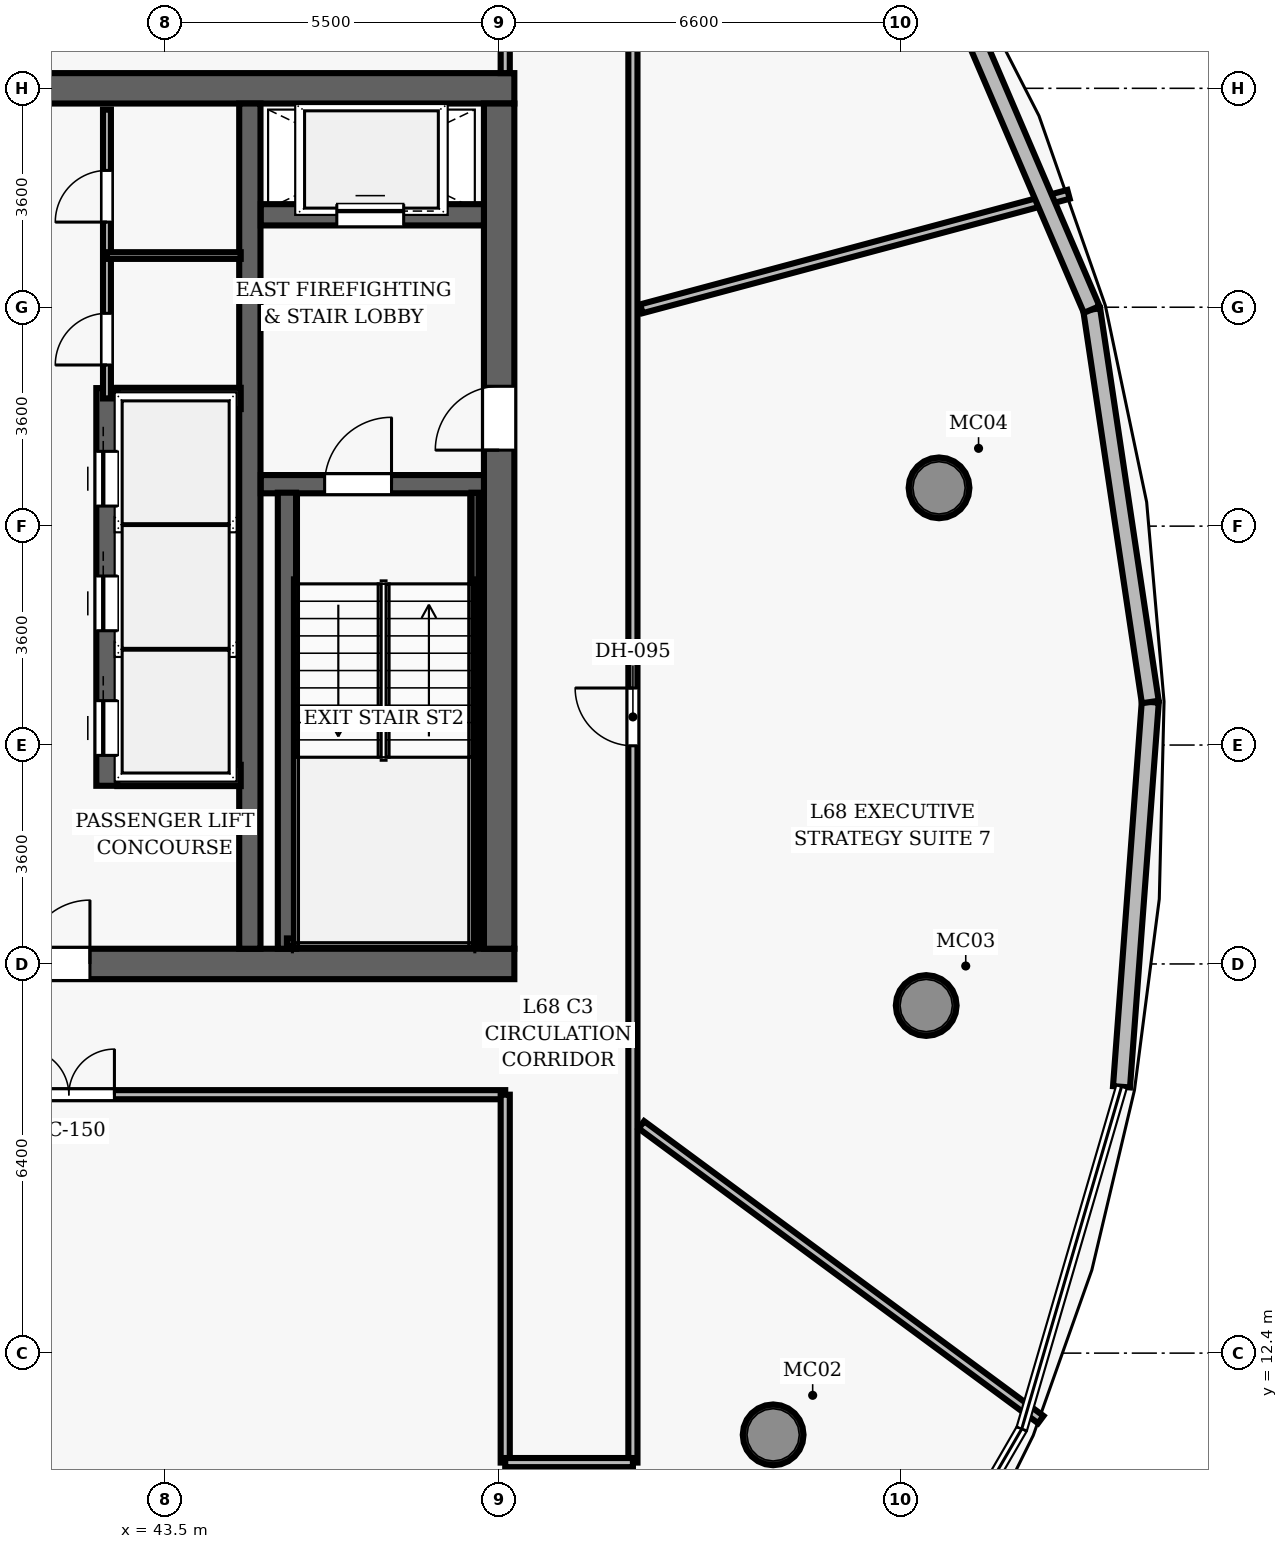
"""IFC4 building model, lengths in metres.
Left out: names, types, materials, properties, quantities, classifications, styles, units other than length and angle.
Written with IfcOpenShell. Run it as: python <this file> out.ifc"""

import sys

from ifc_helpers import new_model, si_unit, direction, frame, frame_2d, origin, origin_2d, place, context, subcontext, project, spatial, rectangle, hollow_circle, extrude, element, fill, save


model = new_model("IFC4")
c1 = context("Model", 3, precision=1e-05, world=origin(), true_north=direction((0.0, 1.0)))
c2 = subcontext(c1, "Body", "Model", "MODEL_VIEW")
j1 = project(units=[si_unit("LENGTHUNIT", "METRE"), si_unit("PLANEANGLEUNIT", "RADIAN")], contexts=[c1])
p1 = place(None, origin())
s1 = spatial("IfcSite", under=j1, at=p1, CompositionType="ELEMENT")
p2 = place(p1, origin())
s2 = spatial("IfcBuilding", under=s1, at=p2, CompositionType="ELEMENT")
p3 = place(p2, frame((0.0, 0.0, 269.0)))
s3 = spatial("IfcBuildingStorey", under=s2, at=p3, CompositionType="ELEMENT", Elevation=269.0)
p4 = place(p3, frame((26.75, 18.8, 0.0), z_axis=(0.0, 0.0, 1.0), x_axis=(1.0, 0.0, 0.0)))
e1 = element("IfcWall", 1, at=p4, inside=s3, PredefinedType="SHEAR", context=c2, shape_type="SweptSolid", body=[
    extrude(rectangle(XDim=22.5, YDim=0.5, at=frame_2d((11.25, 0.0))), origin(), (0.0, 0.0, 1.0), 3.85),
])
p5 = place(p4, frame((14.47, 0.0, 0.0)))
e2 = element("IfcOpeningElement", 2, at=p5, cuts=e1, PredefinedType="OPENING", context=c2, shape_type="SweptSolid", body=[
    extrude(rectangle(XDim=1.05, YDim=2.15, at=frame_2d((0.525, 1.075))), frame((0.0, 0.26, 0.0), z_axis=(0.0, -1.0, 0.0), x_axis=(1.0, 0.0, 0.0)), (0.0, 0.0, 1.0), 0.52),
])
p6 = place(p3, frame((26.75, 33.2, 0.0), z_axis=(0.0, 0.0, 1.0), x_axis=(1.0, 0.0, 0.0)))
e3 = element("IfcWall", 3, at=p6, inside=s3, PredefinedType="SHEAR", context=c2, shape_type="SweptSolid", body=[
    extrude(rectangle(XDim=22.5, YDim=0.5, at=frame_2d((11.25, 0.0))), origin(), (0.0, 0.0, 1.0), 3.85),
])
p7 = place(p3, frame((49.0, 19.05, 0.0), z_axis=(0.0, 0.0, 1.0), x_axis=(0.0, 1.0, 0.0)))
e4 = element("IfcWall", 4, at=p7, inside=s3, PredefinedType="SHEAR", context=c2, shape_type="SweptSolid", body=[
    extrude(rectangle(XDim=13.9, YDim=0.5, at=frame_2d((6.95, 0.0))), origin(), (0.0, 0.0, 1.0), 3.85),
])
p8 = place(p7, frame((8.2, 0.0, 0.0)))
e5 = element("IfcOpeningElement", 5, at=p8, cuts=e4, PredefinedType="OPENING", context=c2, shape_type="SweptSolid", body=[
    extrude(rectangle(XDim=1.05, YDim=2.15, at=frame_2d((0.525, 1.075))), frame((0.0, 0.26, 0.0), z_axis=(0.0, -1.0, 0.0), x_axis=(1.0, 0.0, 0.0)), (0.0, 0.0, 1.0), 0.52),
])
p9 = place(p3, frame((44.9, 19.05, 0.0), z_axis=(0.0, 0.0, 1.0), x_axis=(0.0, 1.0, 0.0)))
e6 = element("IfcWall", 6, at=p9, inside=s3, PredefinedType="SHEAR", context=c2, shape_type="SweptSolid", body=[
    extrude(rectangle(XDim=13.9, YDim=0.35, at=frame_2d((6.95, 0.0))), origin(), (0.0, 0.0, 1.0), 3.85),
])
for number, where, z_axis, x_axis in (
    (7, (53.506, 11.056, 0.0), (0.0, 0.0, 1.0), (1.0, 0.0, 0.0)),
    (8, (56.024, 18.116, 0.0), (0.0, 0.0, 1.0), (1.0, 0.0, 0.0)),
    (9, (56.235, 26.629, 0.0), (0.0, 0.0, 1.0), (1.0, 0.0, 0.0)),
):
    element("IfcColumn", number, at=place(p3, frame(where, z_axis=z_axis, x_axis=x_axis)), inside=s3, PredefinedType="COLUMN", context=c2, shape_type="SweptSolid", body=[
        extrude(hollow_circle(Radius=0.5, WallThickness=0.045, at=origin_2d()), origin(), (0.0, 0.0, 1.0), 3.85),
    ])
p10 = place(p3, frame((45.08, 26.69, 0.0), z_axis=(0.0, 0.0, 1.0), x_axis=(1.0, 0.0, 0.0)))
e10 = element("IfcWall", 10, at=p10, inside=s3, PredefinedType="SHEAR", context=c2, shape_type="SweptSolid", body=[
    extrude(rectangle(XDim=3.67, YDim=0.3, at=frame_2d((1.835, 0.0))), origin(), (0.0, 0.0, 1.0), 3.85),
])
p11 = place(p10, frame((1.05, 0.0, 0.0)))
e11 = element("IfcOpeningElement", 11, at=p11, cuts=e10, PredefinedType="OPENING", context=c2, shape_type="SweptSolid", body=[
    extrude(rectangle(XDim=1.1, YDim=2.15, at=frame_2d((0.55, 1.075))), frame((0.0, 0.16, 0.0), z_axis=(0.0, -1.0, 0.0), x_axis=(1.0, 0.0, 0.0)), (0.0, 0.0, 1.0), 0.32),
])
p12 = place(p3, frame((45.51, 19.05, 0.0), z_axis=(0.0, 0.0, 1.0), x_axis=(0.0, 1.0, 0.0)))
e12 = element("IfcWall", 12, at=p12, inside=s3, PredefinedType="SHEAR", context=c2, shape_type="SweptSolid", body=[
    extrude(rectangle(XDim=7.5, YDim=0.3, at=frame_2d((3.75, 0.0))), origin(), (0.0, 0.0, 1.0), 3.85),
])
p13 = place(p3, frame((48.605, 19.1, 0.0), z_axis=(0.0, 0.0, 1.0), x_axis=(0.0, 1.0, 0.0)))
e13 = element("IfcWall", 13, at=p13, inside=s3, PredefinedType="SHEAR", context=c2, shape_type="SweptSolid", body=[
    extrude(rectangle(XDim=7.45, YDim=0.12, at=frame_2d((3.725, 0.0))), origin(), (0.0, 0.0, 1.0), 3.85),
])
p14 = place(p3, frame((45.51, 19.16, 0.0), z_axis=(0.0, 0.0, 1.0), x_axis=(1.0, 0.0, 0.0)))
e14 = element("IfcWall", 14, at=p14, inside=s3, PredefinedType="SHEAR", context=c2, shape_type="SweptSolid", body=[
    extrude(rectangle(XDim=3.095, YDim=0.12, at=frame_2d((1.547, 0.0))), origin(), (0.0, 0.0, 1.0), 3.85),
])
p15 = place(p3, frame((45.08, 31.12, 0.0), z_axis=(0.0, 0.0, 1.0), x_axis=(1.0, 0.0, 0.0)))
e15 = element("IfcWall", 15, at=p15, inside=s3, PredefinedType="SHEAR", context=c2, shape_type="SweptSolid", body=[
    extrude(rectangle(XDim=3.67, YDim=0.35, at=frame_2d((1.835, 0.0))), origin(), (0.0, 0.0, 1.0), 3.04),
])
p16 = place(p15, frame((1.25, 0.0, 0.0)))
e16 = element("IfcOpeningElement", 16, at=p16, cuts=e15, PredefinedType="OPENING", context=c2, shape_type="SweptSolid", body=[
    extrude(rectangle(XDim=1.1, YDim=2.15, at=frame_2d((0.55, 1.075))), frame((0.0, 0.185, 0.0), z_axis=(0.0, -1.0, 0.0), x_axis=(1.0, 0.0, 0.0)), (0.0, 0.0, 1.0), 0.37),
])
p17 = place(p3, frame((42.55, 21.73, 0.0), z_axis=(0.0, 0.0, 1.0), x_axis=(0.0, 1.0, 0.0)))
e17 = element("IfcWall", 17, at=p17, inside=s3, PredefinedType="SHEAR", context=c2, shape_type="SweptSolid", body=[
    extrude(rectangle(XDim=6.54, YDim=0.35, at=frame_2d((3.27, 0.0))), origin(), (0.0, 0.0, 1.0), 3.04),
])
p18 = place(p17, frame((0.5, 0.0, 0.0)))
e18 = element("IfcOpeningElement", 18, at=p18, cuts=e17, PredefinedType="OPENING", context=c2, shape_type="SweptSolid", body=[
    extrude(rectangle(XDim=0.9, YDim=2.15, at=frame_2d((0.45, 1.075))), frame((0.0, 0.185, 0.0), z_axis=(0.0, -1.0, 0.0), x_axis=(1.0, 0.0, 0.0)), (0.0, 0.0, 1.0), 0.37),
])
p19 = place(p17, frame((2.55, 0.0, 0.0)))
e19 = element("IfcOpeningElement", 19, at=p19, cuts=e17, PredefinedType="OPENING", context=c2, shape_type="SweptSolid", body=[
    extrude(rectangle(XDim=0.9, YDim=2.15, at=frame_2d((0.45, 1.075))), frame((0.0, 0.185, 0.0), z_axis=(0.0, -1.0, 0.0), x_axis=(1.0, 0.0, 0.0)), (0.0, 0.0, 1.0), 0.37),
])
p20 = place(p17, frame((4.6, 0.0, 0.0)))
e20 = element("IfcOpeningElement", 20, at=p20, cuts=e17, PredefinedType="OPENING", context=c2, shape_type="SweptSolid", body=[
    extrude(rectangle(XDim=0.9, YDim=2.15, at=frame_2d((0.45, 1.075))), frame((0.0, 0.185, 0.0), z_axis=(0.0, -1.0, 0.0), x_axis=(1.0, 0.0, 0.0)), (0.0, 0.0, 1.0), 0.37),
])
for number, where, z_axis, x_axis in (
    (21, (42.72, 21.9, 0.0), (0.0, 0.0, 1.0), (1.0, 0.0, 0.0)),
    (22, (42.72, 28.1, 0.0), (0.0, 0.0, 1.0), (1.0, 0.0, 0.0)),
):
    element("IfcWall", number, at=place(p3, frame(where, z_axis=z_axis, x_axis=x_axis)), inside=s3, PredefinedType="SHEAR", context=c2, shape_type="SweptSolid", body=[
        extrude(rectangle(XDim=2.03, YDim=0.35, at=frame_2d((1.015, 0.0))), origin(), (0.0, 0.0, 1.0), 3.04),
    ])
p21 = place(p3, frame((42.55, 28.1, 0.0), z_axis=(0.0, 0.0, 1.0), x_axis=(0.0, 1.0, 0.0)))
e23 = element("IfcWall", 23, at=p21, inside=s3, PredefinedType="PARTITIONING", context=c2, shape_type="SweptSolid", body=[
    extrude(rectangle(XDim=4.75, YDim=0.13, at=frame_2d((2.375, 0.0))), origin(), (0.0, 0.0, 1.0), 3.04),
])
p22 = place(p21, frame((0.55, 0.0, 0.0)))
e24 = element("IfcOpeningElement", 24, at=p22, cuts=e23, PredefinedType="OPENING", context=c2, shape_type="SweptSolid", body=[
    extrude(rectangle(XDim=0.85, YDim=2.1, at=frame_2d((0.425, 1.05))), frame((0.0, 0.075, 0.0), z_axis=(0.0, -1.0, 0.0), x_axis=(1.0, 0.0, 0.0)), (0.0, 0.0, 1.0), 0.15),
])
p23 = place(p21, frame((2.9, 0.0, 0.0)))
e25 = element("IfcOpeningElement", 25, at=p23, cuts=e23, PredefinedType="OPENING", context=c2, shape_type="SweptSolid", body=[
    extrude(rectangle(XDim=0.85, YDim=2.1, at=frame_2d((0.425, 1.05))), frame((0.0, 0.075, 0.0), z_axis=(0.0, -1.0, 0.0), x_axis=(1.0, 0.0, 0.0)), (0.0, 0.0, 1.0), 0.15),
])
p24 = place(p3, frame((42.55, 30.45, 0.0), z_axis=(0.0, 0.0, 1.0), x_axis=(1.0, 0.0, 0.0)))
e26 = element("IfcWall", 26, at=p24, inside=s3, PredefinedType="PARTITIONING", context=c2, shape_type="SweptSolid", body=[
    extrude(rectangle(XDim=2.2, YDim=0.11, at=frame_2d((1.1, 0.0))), origin(), (0.0, 0.0, 1.0), 3.04),
])
p25 = place(p3, frame((26.9, 16.65, 0.0), z_axis=(0.0, 0.0, 1.0), x_axis=(1.0, 0.0, 0.0)))
e27 = element("IfcWall", 27, at=p25, inside=s3, PredefinedType="PARTITIONING", context=c2, shape_type="SweptSolid", body=[
    extrude(rectangle(XDim=22.2, YDim=0.15, at=frame_2d((11.1, 0.0))), origin(), (0.0, 0.0, 1.0), 3.04),
])
p26 = place(p25, frame((8.338, 0.0, 0.0)))
e28 = element("IfcOpeningElement", 28, at=p26, cuts=e27, PredefinedType="OPENING", context=c2, shape_type="SweptSolid", body=[
    extrude(rectangle(XDim=0.95, YDim=2.15, at=frame_2d((0.475, 1.075))), frame((0.0, 0.085, 0.0), z_axis=(0.0, -1.0, 0.0), x_axis=(1.0, 0.0, 0.0)), (0.0, 0.0, 1.0), 0.17),
])
p27 = place(p25, frame((14.273, 0.0, 0.0)))
e29 = element("IfcOpeningElement", 29, at=p27, cuts=e27, PredefinedType="OPENING", context=c2, shape_type="SweptSolid", body=[
    extrude(rectangle(XDim=1.5, YDim=2.2, at=frame_2d((0.75, 1.1))), frame((0.0, 0.085, 0.0), z_axis=(0.0, -1.0, 0.0), x_axis=(1.0, 0.0, 0.0)), (0.0, 0.0, 1.0), 0.17),
])
p28 = place(p3, frame((51.2, 10.6, 0.0), z_axis=(0.0, 0.0, 1.0), x_axis=(0.0, 1.0, 0.0)))
e30 = element("IfcWall", 30, at=p28, inside=s3, PredefinedType="PARTITIONING", context=c2, shape_type="SweptSolid", body=[
    extrude(rectangle(XDim=30.104, YDim=0.15, at=frame_2d((15.052, 0.0))), origin(), (0.0, 0.0, 1.0), 3.04),
])
p29 = place(p28, frame((26.496, 0.0, 0.0)))
e31 = element("IfcOpeningElement", 31, at=p29, cuts=e30, PredefinedType="OPENING", context=c2, shape_type="SweptSolid", body=[
    extrude(rectangle(XDim=1.5, YDim=2.2, at=frame_2d((0.75, 1.1))), frame((0.0, 0.085, 0.0), z_axis=(0.0, -1.0, 0.0), x_axis=(1.0, 0.0, 0.0)), (0.0, 0.0, 1.0), 0.17),
])
p30 = place(p28, frame((11.788, 0.0, 0.0)))
e32 = element("IfcOpeningElement", 32, at=p30, cuts=e30, PredefinedType="OPENING", context=c2, shape_type="SweptSolid", body=[
    extrude(rectangle(XDim=0.95, YDim=2.15, at=frame_2d((0.475, 1.075))), frame((0.0, 0.085, 0.0), z_axis=(0.0, -1.0, 0.0), x_axis=(1.0, 0.0, 0.0)), (0.0, 0.0, 1.0), 0.17),
])
p31 = place(p3, frame((49.1, 10.6, 0.0), z_axis=(0.0, 0.0, 1.0), x_axis=(0.0, 1.0, 0.0)))
e33 = element("IfcWall", 33, at=p31, inside=s3, PredefinedType="PARTITIONING", context=c2, shape_type="SweptSolid", body=[
    extrude(rectangle(XDim=6.05, YDim=0.15, at=frame_2d((3.025, 0.0))), origin(), (0.0, 0.0, 1.0), 3.04),
])
p32 = place(p3, frame((49.1, 33.45, 0.0), z_axis=(0.0, 0.0, 1.0), x_axis=(0.0, 1.0, 0.0)))
e34 = element("IfcWall", 34, at=p32, inside=s3, PredefinedType="PARTITIONING", context=c2, shape_type="SweptSolid", body=[
    extrude(rectangle(XDim=7.254, YDim=0.15, at=frame_2d((3.627, 0.0))), origin(), (0.0, 0.0, 1.0), 3.04),
])
p33 = place(p3, frame((49.1, 10.6, 0.0), z_axis=(0.0, 0.0, 1.0), x_axis=(1.0, 0.0, 0.0)))
e35 = element("IfcWall", 35, at=p33, inside=s3, PredefinedType="PARTITIONING", context=c2, shape_type="SweptSolid", body=[
    extrude(rectangle(XDim=2.1, YDim=0.15, at=frame_2d((1.05, 0.0))), origin(), (0.0, 0.0, 1.0), 3.04),
])
p34 = place(p3, frame((51.34, 29.574, 0.0), z_axis=(0.0, 0.0, 1.0), x_axis=(0.96592722136, 0.258813838569, 0.0)))
e36 = element("IfcWall", 36, at=p34, inside=s3, PredefinedType="PARTITIONING", context=c2, shape_type="SweptSolid", body=[
    extrude(rectangle(XDim=7.272, YDim=0.15, at=frame_2d((3.636, 0.0))), origin(), (0.0, 0.0, 1.0), 3.04),
])
p35 = place(p3, frame((41.259, 33.47, 0.0), z_axis=(0.0, 0.0, 1.0), x_axis=(0.399896869604, 0.916560141879, 0.0)))
e37 = element("IfcWall", 37, at=p35, inside=s3, PredefinedType="PARTITIONING", context=c2, shape_type="SweptSolid", body=[
    extrude(rectangle(XDim=12.616, YDim=0.15, at=frame_2d((6.308, 0.0))), origin(), (0.0, 0.0, 1.0), 3.04),
])
p36 = place(p3, frame((51.34, 16.155, 0.0), z_axis=(0.0, 0.0, 1.0), x_axis=(0.804595515119, -0.593823254049, 0.0)))
e38 = element("IfcWall", 38, at=p36, inside=s3, PredefinedType="PARTITIONING", context=c2, shape_type="SweptSolid", body=[
    extrude(rectangle(XDim=8.163, YDim=0.15, at=frame_2d((4.081, 0.0))), origin(), (0.0, 0.0, 1.0), 3.04),
])
p37 = place(p3, frame((59.709, 23.108, 0.0), z_axis=(0.0, 0.0, 1.0), x_axis=(-0.074604383592, -0.997213209875, 0.0)))
e39 = element("IfcWall", 39, at=p37, inside=s3, PredefinedType="SOLIDWALL", context=c2, shape_type="SweptSolid", body=[
    extrude(rectangle(XDim=6.345, YDim=0.28, at=frame_2d((3.173, 0.0))), origin(), (0.0, 0.0, 1.0), 3.625),
])
p38 = place(p3, frame((58.745, 29.562, 0.0), z_axis=(0.0, 0.0, 1.0), x_axis=(0.147692842874, -0.989033277582, 0.0)))
e40 = element("IfcWall", 40, at=p38, inside=s3, PredefinedType="SOLIDWALL", context=c2, shape_type="SweptSolid", body=[
    extrude(rectangle(XDim=6.526, YDim=0.28, at=frame_2d((3.263, 0.0))), origin(), (0.0, 0.0, 1.0), 3.625),
])
p39 = place(p3, frame((56.172, 35.561, 0.0), z_axis=(0.0, 0.0, 1.0), x_axis=(0.394248824312, -0.919003734774, 0.0)))
e41 = element("IfcWall", 41, at=p39, inside=s3, PredefinedType="SOLIDWALL", context=c2, shape_type="SweptSolid", body=[
    extrude(rectangle(XDim=6.527, YDim=0.28, at=frame_2d((3.263, 0.0))), origin(), (0.0, 0.0, 1.0), 3.625),
])
p40 = place(p11, origin())
e42 = element("IfcDoor", 42, at=p40, inside=s3, OperationType="SINGLE_SWING_RIGHT", PredefinedType="DOOR", context=c2, shape_type="SweptSolid", body=[
    extrude(rectangle(XDim=1.1, YDim=2.15, at=frame_2d((0.55, 1.075))), frame((0.0, 0.025, 0.0), z_axis=(0.0, -1.0, 0.0), x_axis=(1.0, 0.0, 0.0)), (0.0, 0.0, 1.0), 0.05),
])
fill(e11, e42)
p41 = place(p8, origin())
e43 = element("IfcDoor", 43, at=p41, inside=s3, OperationType="SINGLE_SWING_LEFT", PredefinedType="DOOR", context=c2, shape_type="SweptSolid", body=[
    extrude(rectangle(XDim=1.05, YDim=2.15, at=frame_2d((0.525, 1.075))), frame((0.0, 0.025, 0.0), z_axis=(0.0, -1.0, 0.0), x_axis=(1.0, 0.0, 0.0)), (0.0, 0.0, 1.0), 0.05),
])
fill(e5, e43)
p42 = place(p5, origin())
e44 = element("IfcDoor", 44, at=p42, inside=s3, OperationType="SINGLE_SWING_RIGHT", PredefinedType="DOOR", context=c2, shape_type="SweptSolid", body=[
    extrude(rectangle(XDim=1.05, YDim=2.15, at=frame_2d((0.525, 1.075))), frame((0.0, 0.025, 0.0), z_axis=(0.0, -1.0, 0.0), x_axis=(1.0, 0.0, 0.0)), (0.0, 0.0, 1.0), 0.05),
])
fill(e2, e44)
p43 = place(p22, origin())
e45 = element("IfcDoor", 45, at=p43, inside=s3, OperationType="SINGLE_SWING_LEFT", PredefinedType="DOOR", context=c2, shape_type="SweptSolid", body=[
    extrude(rectangle(XDim=0.85, YDim=2.1, at=frame_2d((0.425, 1.05))), frame((0.0, 0.025, 0.0), z_axis=(0.0, -1.0, 0.0), x_axis=(1.0, 0.0, 0.0)), (0.0, 0.0, 1.0), 0.05),
])
fill(e24, e45)
p44 = place(p23, origin())
e46 = element("IfcDoor", 46, at=p44, inside=s3, OperationType="SINGLE_SWING_LEFT", PredefinedType="DOOR", context=c2, shape_type="SweptSolid", body=[
    extrude(rectangle(XDim=0.85, YDim=2.1, at=frame_2d((0.425, 1.05))), frame((0.0, 0.025, 0.0), z_axis=(0.0, -1.0, 0.0), x_axis=(1.0, 0.0, 0.0)), (0.0, 0.0, 1.0), 0.05),
])
fill(e25, e46)
p45 = place(p27, origin())
e47 = element("IfcDoor", 47, at=p45, inside=s3, OperationType="DOUBLE_DOOR_SINGLE_SWING", PredefinedType="DOOR", context=c2, shape_type="SweptSolid", body=[
    extrude(rectangle(XDim=1.5, YDim=2.2, at=frame_2d((0.75, 1.1))), frame((0.0, 0.025, 0.0), z_axis=(0.0, -1.0, 0.0), x_axis=(1.0, 0.0, 0.0)), (0.0, 0.0, 1.0), 0.05),
])
fill(e29, e47)
p46 = place(p30, origin())
e48 = element("IfcDoor", 48, at=p46, inside=s3, OperationType="SINGLE_SWING_RIGHT", PredefinedType="DOOR", context=c2, shape_type="SweptSolid", body=[
    extrude(rectangle(XDim=0.95, YDim=2.15, at=frame_2d((0.475, 1.075))), frame((0.0, 0.025, 0.0), z_axis=(0.0, -1.0, 0.0), x_axis=(1.0, 0.0, 0.0)), (0.0, 0.0, 1.0), 0.05),
])
fill(e32, e48)
p47 = place(p18, origin())
e49 = element("IfcDoor", 49, at=p47, inside=s3, OperationType="SLIDING_TO_LEFT", PredefinedType="DOOR", context=c2, shape_type="SweptSolid", body=[
    extrude(rectangle(XDim=0.9, YDim=2.15, at=frame_2d((0.45, 1.075))), frame((0.0, 0.025, 0.0), z_axis=(0.0, -1.0, 0.0), x_axis=(1.0, 0.0, 0.0)), (0.0, 0.0, 1.0), 0.05),
])
fill(e18, e49)
p48 = place(p19, origin())
e50 = element("IfcDoor", 50, at=p48, inside=s3, OperationType="SLIDING_TO_LEFT", PredefinedType="DOOR", context=c2, shape_type="SweptSolid", body=[
    extrude(rectangle(XDim=0.9, YDim=2.15, at=frame_2d((0.45, 1.075))), frame((0.0, 0.025, 0.0), z_axis=(0.0, -1.0, 0.0), x_axis=(1.0, 0.0, 0.0)), (0.0, 0.0, 1.0), 0.05),
])
fill(e19, e50)
p49 = place(p20, origin())
e51 = element("IfcDoor", 51, at=p49, inside=s3, OperationType="SLIDING_TO_LEFT", PredefinedType="DOOR", context=c2, shape_type="SweptSolid", body=[
    extrude(rectangle(XDim=0.9, YDim=2.15, at=frame_2d((0.45, 1.075))), frame((0.0, 0.025, 0.0), z_axis=(0.0, -1.0, 0.0), x_axis=(1.0, 0.0, 0.0)), (0.0, 0.0, 1.0), 0.05),
])
fill(e20, e51)
p50 = place(p16, origin())
e52 = element("IfcDoor", 52, at=p50, inside=s3, OperationType="SLIDING_TO_LEFT", PredefinedType="DOOR", context=c2, shape_type="SweptSolid", body=[
    extrude(rectangle(XDim=1.1, YDim=2.15, at=frame_2d((0.55, 1.075))), frame((0.0, 0.025, 0.0), z_axis=(0.0, -1.0, 0.0), x_axis=(1.0, 0.0, 0.0)), (0.0, 0.0, 1.0), 0.05),
])
fill(e16, e52)
save(model, sys.argv[1])
